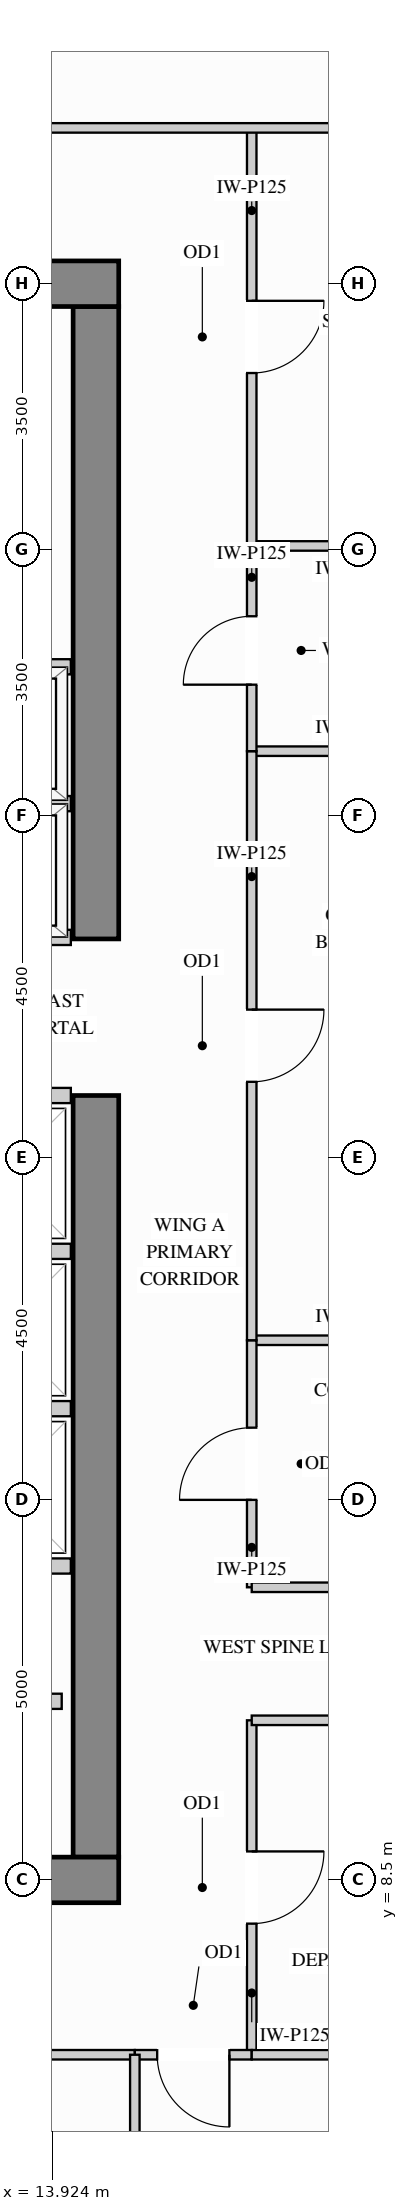
"""IFC4 building model, lengths in metres.
Left out: names, types, materials, properties, quantities, classifications, styles, units other than length and angle.
Written with IfcOpenShell. Run it as: python <this file> out.ifc"""

import sys

from ifc_helpers import new_model, si_unit, direction, frame, frame_2d, origin, place, context, subcontext, project, spatial, rectangle, extrude, source, transform, mapped, element, fill, save


model = new_model("IFC4")
c1 = context("Model", 3, precision=1e-05, world=origin(), true_north=direction((0.0, 1.0)))
c2 = subcontext(c1, "Body", "Model", "MODEL_VIEW")
j1 = project(units=[si_unit("LENGTHUNIT", "METRE"), si_unit("PLANEANGLEUNIT", "RADIAN")], contexts=[c1])
p1 = place(None, origin())
s1 = spatial("IfcSite", under=j1, at=p1, CompositionType="ELEMENT")
p2 = place(p1, origin())
s2 = spatial("IfcBuilding", under=s1, at=p2, CompositionType="ELEMENT")
p3 = place(p2, frame((0.0, 0.0, 189.9)))
s3 = spatial("IfcBuildingStorey", under=s2, at=p3, CompositionType="ELEMENT", Elevation=189.9)
m1 = source(origin(), c2, "Body", "SweptSolid", [
    extrude(rectangle(XDim=10.02, YDim=0.6, at=frame_2d((5.01, 0.0))), origin(), (0.0, 0.0, 1.0), 3.4),
])
p4 = place(p3, frame((14.5, 8.8, 0.0), z_axis=(0.0, 0.0, 1.0), x_axis=(0.0, 1.0, 0.0)))
e1 = element("IfcWall", 1, at=p4, inside=s3, PredefinedType="SHEAR", context=c2, shape_type="MappedRepresentation", body=[
    mapped(m1, transform((0.0, 0.0, 0.0), x_axis=(1.0, 0.0, 0.0), y_axis=(0.0, 1.0, 0.0), z_axis=(0.0, 0.0, 1.0))),
])
m2 = source(origin(), c2, "Body", "SweptSolid", [
    extrude(rectangle(XDim=8.32, YDim=0.6, at=frame_2d((4.16, 0.0))), origin(), (0.0, 0.0, 1.0), 3.4),
])
p5 = place(p3, frame((14.5, 20.88, 0.0), z_axis=(0.0, 0.0, 1.0), x_axis=(0.0, 1.0, 0.0)))
e2 = element("IfcWall", 2, at=p5, inside=s3, PredefinedType="SHEAR", context=c2, shape_type="MappedRepresentation", body=[
    mapped(m2, transform((0.0, 0.0, 0.0), x_axis=(1.0, 0.0, 0.0), y_axis=(0.0, 1.0, 0.0), z_axis=(0.0, 0.0, 1.0))),
])
m3 = source(origin(), c2, "Body", "SweptSolid", [
    extrude(rectangle(XDim=10.6, YDim=0.6, at=frame_2d((5.3, 0.0))), origin(), (0.0, 0.0, 1.0), 3.4),
])
for number, where, z_axis, x_axis in (
    (3, (4.2, 29.5, 0.0), (0.0, 0.0, 1.0), (1.0, 0.0, 0.0)),
    (4, (4.2, 8.5, 0.0), (0.0, 0.0, 1.0), (1.0, 0.0, 0.0)),
):
    element("IfcWall", number, at=place(p3, frame(where, z_axis=z_axis, x_axis=x_axis)), inside=s3, PredefinedType="SHEAR", context=c2, shape_type="MappedRepresentation", body=[
        mapped(m3, transform((0.0, 0.0, 0.0), x_axis=(1.0, 0.0, 0.0), y_axis=(0.0, 1.0, 0.0), z_axis=(0.0, 0.0, 1.0))),
    ])
m4 = source(origin(), c2, "Body", "SweptSolid", [
    extrude(rectangle(XDim=2.6, YDim=0.125, at=frame_2d((1.3, 0.0))), origin(), (0.0, 0.0, 1.0), 3.385),
])
p6 = place(p3, frame((16.55, 15.6, 0.0), z_axis=(0.0, 0.0, 1.0), x_axis=(1.0, 0.0, 0.0)))
e5 = element("IfcWall", 5, at=p6, inside=s3, PredefinedType="PARTITIONING", context=c2, shape_type="MappedRepresentation", body=[
    mapped(m4, transform((0.0, 0.0, 0.0), x_axis=(1.0, 0.0, 0.0), y_axis=(0.0, 1.0, 0.0), z_axis=(0.0, 0.0, 1.0))),
])
m5 = source(origin(), c2, "Body", "SweptSolid", [
    extrude(rectangle(XDim=2.598, YDim=0.125, at=frame_2d((1.299, 0.0))), origin(), (0.0, 0.0, 1.0), 3.385),
])
for number, where, z_axis, x_axis in (
    (6, (16.55, 23.35, 0.0), (0.0, 0.0, 1.0), (1.0, 0.0, 0.0)),
    (7, (16.55, 26.05, 0.0), (0.0, 0.0, 1.0), (1.0, 0.0, 0.0)),
):
    element("IfcWall", number, at=place(p3, frame(where, z_axis=z_axis, x_axis=x_axis)), inside=s3, PredefinedType="PARTITIONING", context=c2, shape_type="MappedRepresentation", body=[
        mapped(m5, transform((0.0, 0.0, 0.0), x_axis=(1.0, 0.0, 0.0), y_axis=(0.0, 1.0, 0.0), z_axis=(0.0, 0.0, 1.0))),
    ])
p7 = place(p3, frame((16.55, 12.35, 0.0), z_axis=(0.0, 0.0, 1.0), x_axis=(0.0, 1.0, 0.0)))
e8 = element("IfcWall", 8, at=p7, inside=s3, PredefinedType="PARTITIONING", context=c2, shape_type="SweptSolid", body=[
    extrude(rectangle(XDim=3.25, YDim=0.125, at=frame_2d((1.625, 0.0))), origin(), (0.0, 0.0, 1.0), 3.385),
])
p8 = place(p7, frame((1.15, 0.0, 0.0)))
e9 = element("IfcOpeningElement", 9, at=p8, cuts=e8, PredefinedType="OPENING", context=c2, shape_type="SweptSolid", body=[
    extrude(rectangle(XDim=0.95, YDim=2.15, at=frame_2d((0.475, 1.075))), frame((0.0, 0.073, 0.0), z_axis=(0.0, -1.0, 0.0), x_axis=(1.0, 0.0, 0.0)), (0.0, 0.0, 1.0), 0.145),
])
p9 = place(p3, frame((16.55, 15.6, 0.0), z_axis=(0.0, 0.0, 1.0), x_axis=(0.0, 1.0, 0.0)))
e10 = element("IfcWall", 10, at=p9, inside=s3, PredefinedType="PARTITIONING", context=c2, shape_type="SweptSolid", body=[
    extrude(rectangle(XDim=7.75, YDim=0.125, at=frame_2d((3.875, 0.0))), origin(), (0.0, 0.0, 1.0), 3.385),
])
p10 = place(p9, frame((3.4, 0.0, 0.0)))
e11 = element("IfcOpeningElement", 11, at=p10, cuts=e10, PredefinedType="OPENING", context=c2, shape_type="SweptSolid", body=[
    extrude(rectangle(XDim=0.95, YDim=2.15, at=frame_2d((0.475, 1.075))), frame((0.0, 0.073, 0.0), z_axis=(0.0, -1.0, 0.0), x_axis=(1.0, 0.0, 0.0)), (0.0, 0.0, 1.0), 0.145),
])
p11 = place(p3, frame((16.55, 26.05, 0.0), z_axis=(0.0, 0.0, 1.0), x_axis=(0.0, 1.0, 0.0)))
e12 = element("IfcWall", 12, at=p11, inside=s3, PredefinedType="PARTITIONING", context=c2, shape_type="SweptSolid", body=[
    extrude(rectangle(XDim=5.5, YDim=0.125, at=frame_2d((2.75, 0.0))), origin(), (0.0, 0.0, 1.0), 3.385),
])
p12 = place(p11, frame((2.275, 0.0, 0.0)))
e13 = element("IfcOpeningElement", 13, at=p12, cuts=e12, PredefinedType="OPENING", context=c2, shape_type="SweptSolid", body=[
    extrude(rectangle(XDim=0.95, YDim=2.15, at=frame_2d((0.475, 1.075))), frame((0.0, 0.073, 0.0), z_axis=(0.0, -1.0, 0.0), x_axis=(1.0, 0.0, 0.0)), (0.0, 0.0, 1.0), 0.145),
])
p13 = place(p3, frame((16.55, 6.2, 0.0), z_axis=(0.0, 0.0, 1.0), x_axis=(0.0, 1.0, 0.0)))
e14 = element("IfcWall", 14, at=p13, inside=s3, PredefinedType="PARTITIONING", context=c2, shape_type="SweptSolid", body=[
    extrude(rectangle(XDim=4.4, YDim=0.125, at=frame_2d((2.2, 0.0))), origin(), (0.0, 0.0, 1.0), 3.385),
])
p14 = place(p13, frame((1.725, 0.0, 0.0)))
e15 = element("IfcOpeningElement", 15, at=p14, cuts=e14, PredefinedType="OPENING", context=c2, shape_type="SweptSolid", body=[
    extrude(rectangle(XDim=0.95, YDim=2.15, at=frame_2d((0.475, 1.075))), frame((0.0, 0.073, 0.0), z_axis=(0.0, -1.0, 0.0), x_axis=(1.0, 0.0, 0.0)), (0.0, 0.0, 1.0), 0.145),
])
p15 = place(p3, frame((16.55, 23.35, 0.0), z_axis=(0.0, 0.0, 1.0), x_axis=(0.0, 1.0, 0.0)))
e16 = element("IfcWall", 16, at=p15, inside=s3, PredefinedType="PARTITIONING", context=c2, shape_type="SweptSolid", body=[
    extrude(rectangle(XDim=2.7, YDim=0.125, at=frame_2d((1.35, 0.0))), origin(), (0.0, 0.0, 1.0), 3.385),
])
p16 = place(p15, frame((0.875, 0.0, 0.0)))
e17 = element("IfcOpeningElement", 17, at=p16, cuts=e16, PredefinedType="OPENING", context=c2, shape_type="SweptSolid", body=[
    extrude(rectangle(XDim=0.9, YDim=2.15, at=frame_2d((0.45, 1.075))), frame((0.0, 0.073, 0.0), z_axis=(0.0, -1.0, 0.0), x_axis=(1.0, 0.0, 0.0)), (0.0, 0.0, 1.0), 0.145),
])
m6 = source(origin(), c2, "Body", "SweptSolid", [
    extrude(rectangle(XDim=12.598, YDim=0.125, at=frame_2d((6.299, 0.0))), origin(), (0.0, 0.0, 1.0), 3.385),
])
p17 = place(p3, frame((6.55, 31.55, 0.0), z_axis=(0.0, 0.0, 1.0), x_axis=(1.0, 0.0, 0.0)))
e18 = element("IfcWall", 18, at=p17, inside=s3, PredefinedType="PARTITIONING", context=c2, shape_type="MappedRepresentation", body=[
    mapped(m6, transform((0.0, 0.0, 0.0), x_axis=(1.0, 0.0, 0.0), y_axis=(0.0, 1.0, 0.0), z_axis=(0.0, 0.0, 1.0))),
])
m7 = source(origin(), c2, "Body", "SweptSolid", [
    extrude(rectangle(XDim=2.95, YDim=0.125, at=frame_2d((1.475, 0.0))), origin(), (0.0, 0.0, 1.0), 3.385),
])
for number, where, z_axis, x_axis in (
    (19, (16.55, 12.35, 0.0), (0.0, 0.0, 1.0), (1.0, 0.0, 0.0)),
    (20, (16.55, 10.6, 0.0), (0.0, 0.0, 1.0), (1.0, 0.0, 0.0)),
):
    element("IfcWall", number, at=place(p3, frame(where, z_axis=z_axis, x_axis=x_axis)), inside=s3, PredefinedType="PARTITIONING", context=c2, shape_type="MappedRepresentation", body=[
        mapped(m7, transform((0.0, 0.0, 0.0), x_axis=(1.0, 0.0, 0.0), y_axis=(0.0, 1.0, 0.0), z_axis=(0.0, 0.0, 1.0))),
    ])
p18 = place(p3, frame((10.875, 6.2, 0.0), z_axis=(0.0, 0.0, 1.0), x_axis=(1.0, 0.0, 0.0)))
e21 = element("IfcWall", 21, at=p18, inside=s3, PredefinedType="PARTITIONING", context=c2, shape_type="SweptSolid", body=[
    extrude(rectangle(XDim=4.137, YDim=0.125, at=frame_2d((2.068, 0.0))), origin(), (0.0, 0.0, 1.0), 2.848),
])
p19 = place(p18, frame((1.594, 0.0, 0.0)))
e22 = element("IfcOpeningElement", 22, at=p19, cuts=e21, PredefinedType="OPENING", context=c2, shape_type="SweptSolid", body=[
    extrude(rectangle(XDim=0.95, YDim=2.15, at=frame_2d((0.475, 1.075))), frame((0.0, 0.073, 0.0), z_axis=(0.0, -1.0, 0.0), x_axis=(1.0, 0.0, 0.0)), (0.0, 0.0, 1.0), 0.145),
])
p20 = place(p3, frame((15.012, 6.2, 0.0), z_axis=(0.0, 0.0, 1.0), x_axis=(1.0, 0.0, 0.0)))
e23 = element("IfcWall", 23, at=p20, inside=s3, PredefinedType="PARTITIONING", context=c2, shape_type="SweptSolid", body=[
    extrude(rectangle(XDim=1.538, YDim=0.125, at=frame_2d((0.769, 0.0))), origin(), (0.0, 0.0, 1.0), 2.848),
])
p21 = place(p20, frame((0.294, 0.0, 0.0)))
e24 = element("IfcOpeningElement", 24, at=p21, cuts=e23, PredefinedType="OPENING", context=c2, shape_type="SweptSolid", body=[
    extrude(rectangle(XDim=0.95, YDim=2.15, at=frame_2d((0.475, 1.075))), frame((0.0, 0.073, 0.0), z_axis=(0.0, -1.0, 0.0), x_axis=(1.0, 0.0, 0.0)), (0.0, 0.0, 1.0), 0.145),
])
m8 = source(origin(), c2, "Body", "SweptSolid", [
    extrude(rectangle(XDim=2.598, YDim=0.125, at=frame_2d((1.299, 0.0))), origin(), (0.0, 0.0, 1.0), 2.848),
])
p22 = place(p3, frame((16.55, 6.2, 0.0), z_axis=(0.0, 0.0, 1.0), x_axis=(1.0, 0.0, 0.0)))
e25 = element("IfcWall", 25, at=p22, inside=s3, PredefinedType="PARTITIONING", context=c2, shape_type="MappedRepresentation", body=[
    mapped(m8, transform((0.0, 0.0, 0.0), x_axis=(1.0, 0.0, 0.0), y_axis=(0.0, 1.0, 0.0), z_axis=(0.0, 0.0, 1.0))),
])
m9 = source(origin(), c2, "Body", "SweptSolid", [
    extrude(rectangle(XDim=5.08, YDim=0.125, at=frame_2d((2.54, 0.0))), origin(), (0.0, 0.0, 1.0), 3.385),
])
p23 = place(p3, frame((15.012, 1.12, 0.0), z_axis=(0.0, 0.0, 1.0), x_axis=(0.0, 1.0, 0.0)))
e26 = element("IfcWall", 26, at=p23, inside=s3, PredefinedType="PARTITIONING", context=c2, shape_type="MappedRepresentation", body=[
    mapped(m9, transform((0.0, 0.0, 0.0), x_axis=(1.0, 0.0, 0.0), y_axis=(0.0, 1.0, 0.0), z_axis=(0.0, 0.0, 1.0))),
])
m10 = source(origin(), c2, "Body", "SweptSolid", [
    extrude(rectangle(XDim=1.63, YDim=0.2, at=frame_2d((0.815, 0.0))), origin(), (0.0, 0.0, 1.0), 3.385),
])
p24 = place(p3, frame((12.42, 10.85, 0.0), z_axis=(0.0, 0.0, 1.0), x_axis=(1.0, 0.0, 0.0)))
e27 = element("IfcWall", 27, at=p24, inside=s3, PredefinedType="PARTITIONING", context=c2, shape_type="MappedRepresentation", body=[
    mapped(m10, transform((0.0, 0.0, 0.0), x_axis=(1.0, 0.0, 0.0), y_axis=(0.0, 1.0, 0.0), z_axis=(0.0, 0.0, 1.0))),
])
m11 = source(origin(), c2, "Body", "SweptSolid", [
    extrude(rectangle(XDim=2.34, YDim=0.2, at=frame_2d((1.17, 0.0))), origin(), (0.0, 0.0, 1.0), 3.385),
])
for number, where, z_axis, x_axis in (
    (28, (11.83, 22.66, 0.0), (0.0, 0.0, 1.0), (1.0, 0.0, 0.0)),
    (29, (11.83, 20.9, 0.0), (0.0, 0.0, 1.0), (1.0, 0.0, 0.0)),
    (30, (11.83, 24.46, 0.0), (0.0, 0.0, 1.0), (1.0, 0.0, 0.0)),
):
    element("IfcWall", number, at=place(p3, frame(where, z_axis=z_axis, x_axis=x_axis)), inside=s3, PredefinedType="PARTITIONING", context=c2, shape_type="MappedRepresentation", body=[
        mapped(m11, transform((0.0, 0.0, 0.0), x_axis=(1.0, 0.0, 0.0), y_axis=(0.0, 1.0, 0.0), z_axis=(0.0, 0.0, 1.0))),
    ])
m12 = source(origin(), c2, "Body", "SweptSolid", [
    extrude(rectangle(XDim=1.94, YDim=0.2, at=frame_2d((0.97, 0.0))), origin(), (0.0, 0.0, 1.0), 3.385),
])
for number, where, z_axis, x_axis in (
    (31, (12.23, 14.7, 0.0), (0.0, 0.0, 1.0), (1.0, 0.0, 0.0)),
    (32, (12.23, 12.63, 0.0), (0.0, 0.0, 1.0), (1.0, 0.0, 0.0)),
    (33, (12.23, 16.77, 0.0), (0.0, 0.0, 1.0), (1.0, 0.0, 0.0)),
    (34, (12.23, 18.82, 0.0), (0.0, 0.0, 1.0), (1.0, 0.0, 0.0)),
):
    element("IfcWall", number, at=place(p3, frame(where, z_axis=z_axis, x_axis=x_axis)), inside=s3, PredefinedType="PARTITIONING", context=c2, shape_type="MappedRepresentation", body=[
        mapped(m12, transform((0.0, 0.0, 0.0), x_axis=(1.0, 0.0, 0.0), y_axis=(0.0, 1.0, 0.0), z_axis=(0.0, 0.0, 1.0))),
    ])
m13 = source(origin(), c2, "Body", "SweptSolid", [
    extrude(rectangle(XDim=0.95, YDim=2.15, at=frame_2d((0.475, 1.075))), frame((0.0, 0.025, 0.0), z_axis=(0.0, -1.0, 0.0), x_axis=(1.0, 0.0, 0.0)), (0.0, 0.0, 1.0), 0.05),
])
p25 = place(p14, origin())
e35 = element("IfcDoor", 35, at=p25, inside=s3, OperationType="SINGLE_SWING_RIGHT", PredefinedType="DOOR", context=c2, shape_type="MappedRepresentation", body=[
    mapped(m13, transform((0.0, 0.0, 0.0), x_axis=(1.0, 0.0, 0.0), y_axis=(0.0, 1.0, 0.0), z_axis=(0.0, 0.0, 1.0))),
])
fill(e15, e35)
p26 = place(p8, origin())
e36 = element("IfcDoor", 36, at=p26, inside=s3, OperationType="SINGLE_SWING_LEFT", PredefinedType="DOOR", context=c2, shape_type="MappedRepresentation", body=[
    mapped(m13, transform((0.0, 0.0, 0.0), x_axis=(1.0, 0.0, 0.0), y_axis=(0.0, 1.0, 0.0), z_axis=(0.0, 0.0, 1.0))),
])
fill(e9, e36)
p27 = place(p10, origin())
e37 = element("IfcDoor", 37, at=p27, inside=s3, OperationType="SINGLE_SWING_RIGHT", PredefinedType="DOOR", context=c2, shape_type="MappedRepresentation", body=[
    mapped(m13, transform((0.0, 0.0, 0.0), x_axis=(1.0, 0.0, 0.0), y_axis=(0.0, 1.0, 0.0), z_axis=(0.0, 0.0, 1.0))),
])
fill(e11, e37)
p28 = place(p12, origin())
e38 = element("IfcDoor", 38, at=p28, inside=s3, OperationType="SINGLE_SWING_RIGHT", PredefinedType="DOOR", context=c2, shape_type="MappedRepresentation", body=[
    mapped(m13, transform((0.0, 0.0, 0.0), x_axis=(1.0, 0.0, 0.0), y_axis=(0.0, 1.0, 0.0), z_axis=(0.0, 0.0, 1.0))),
])
fill(e13, e38)
p29 = place(p21, origin())
e39 = element("IfcDoor", 39, at=p29, inside=s3, OperationType="SINGLE_SWING_RIGHT", PredefinedType="DOOR", context=c2, shape_type="MappedRepresentation", body=[
    mapped(m13, transform((0.0, 0.0, 0.0), x_axis=(1.0, 0.0, 0.0), y_axis=(0.0, 1.0, 0.0), z_axis=(0.0, 0.0, 1.0))),
])
fill(e24, e39)
m14 = source(origin(), c2, "Body", "SweptSolid", [
    extrude(rectangle(XDim=0.9, YDim=2.15, at=frame_2d((0.45, 1.075))), frame((0.0, 0.025, 0.0), z_axis=(0.0, -1.0, 0.0), x_axis=(1.0, 0.0, 0.0)), (0.0, 0.0, 1.0), 0.05),
])
p30 = place(p16, origin())
e40 = element("IfcDoor", 40, at=p30, inside=s3, OperationType="SINGLE_SWING_LEFT", PredefinedType="DOOR", context=c2, shape_type="MappedRepresentation", body=[
    mapped(m14, transform((0.0, 0.0, 0.0), x_axis=(1.0, 0.0, 0.0), y_axis=(0.0, 1.0, 0.0), z_axis=(0.0, 0.0, 1.0))),
])
fill(e17, e40)
save(model, sys.argv[1])
